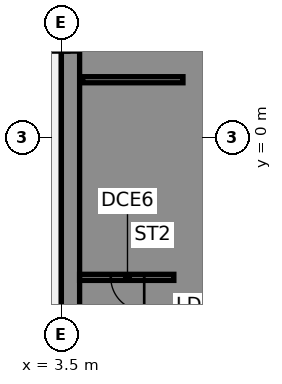
"""IFC4 building model, lengths in metres.
Left out: names, types, materials, properties, quantities, classifications, styles, units other than length and angle.
Written with IfcOpenShell. Run it as: python <this file> out.ifc"""

import sys

from ifc_helpers import new_model, si_unit, direction, frame, frame_2d, origin, place, context, subcontext, project, spatial, polyline, rectangle, outline, extrude, element, fill, save


model = new_model("IFC4")
c1 = context("Model", 3, precision=1e-05, world=origin(), true_north=direction((0.0, 1.0)))
c2 = subcontext(c1, "Body", "Model", "MODEL_VIEW")
j1 = project(units=[si_unit("LENGTHUNIT", "METRE"), si_unit("PLANEANGLEUNIT", "RADIAN")], contexts=[c1])
p1 = place(None, origin())
s1 = spatial("IfcSite", under=j1, at=p1, CompositionType="ELEMENT")
p2 = place(p1, origin())
s2 = spatial("IfcBuilding", under=s1, at=p2, CompositionType="ELEMENT")
p3 = place(p2, frame((0.0, 0.0, 109.75)))
s3 = spatial("IfcBuildingStorey", under=s2, at=p3, CompositionType="ELEMENT", Elevation=109.75)
p4 = place(p3, origin())
e1 = element("IfcWall", 1, at=p4, inside=s3, PredefinedType="SHEAR", context=c2, shape_type="SweptSolid", body=[
    extrude(outline(polyline([(9.8, -5.375), (7.5, -5.375), (7.5, -2.875), (9.8, -2.875), (9.8, -2.625), (7.5, -2.625), (7.5, -0.125), (9.8, -0.125), (9.8, 0.125), (7.5, 0.125), (7.5, 2.625), (9.8, 2.625), (9.8, 2.875), (7.5, 2.875), (7.5, 5.375), (9.8, 5.375), (9.8, 5.625), (7.5, 5.625), (7.5, 8.125), (9.8, 8.125), (9.8, 8.9), (7.5, 8.9), (7.2, 8.9), (7.2, -5.625), (7.5, -5.625), (9.8, -5.625), (9.8, -5.375)])), origin(), (0.0, 0.0, 1.0), 3.61),
])
p5 = place(p3, frame((7.5, 1.9, 0.0), z_axis=(0.0, 0.0, 1.0), x_axis=(-1.0, 0.0, 0.0)))
e2 = element("IfcWall", 2, at=p5, inside=s3, PredefinedType="SHEAR", context=c2, shape_type="SweptSolid", body=[
    extrude(rectangle(XDim=3.3, YDim=0.2, at=frame_2d((1.65, 0.0))), origin(), (0.0, 0.0, 1.0), 3.61),
])
p6 = place(p3, frame((3.8, -8.9, 0.0), z_axis=(0.0, 0.0, 1.0), x_axis=(0.0, 1.0, 0.0)))
e3 = element("IfcWall", 3, at=p6, inside=s3, PredefinedType="SHEAR", context=c2, shape_type="SweptSolid", body=[
    extrude(rectangle(XDim=17.8, YDim=0.6, at=frame_2d((8.9, 0.0))), origin(), (0.0, 0.0, 1.0), 3.61),
])
p7 = place(p6, frame((1.25, 0.0, 0.0)))
e4 = element("IfcOpeningElement", 4, at=p7, cuts=e3, PredefinedType="OPENING", context=c2, shape_type="SweptSolid", body=[
    extrude(rectangle(XDim=1.8, YDim=2.1, at=frame_2d((0.9, 1.05))), frame((0.0, 0.31, 0.0), z_axis=(0.0, -1.0, 0.0), x_axis=(1.0, 0.0, 0.0)), (0.0, 0.0, 1.0), 0.62),
])
p8 = place(p6, frame((11.698, 0.0, 0.0)))
e5 = element("IfcOpeningElement", 5, at=p8, cuts=e3, PredefinedType="OPENING", context=c2, shape_type="SweptSolid", body=[
    extrude(rectangle(XDim=1.0, YDim=2.1, at=frame_2d((0.5, 1.05))), frame((0.0, 0.31, 0.0), z_axis=(0.0, -1.0, 0.0), x_axis=(1.0, 0.0, 0.0)), (0.0, 0.0, 1.0), 0.62),
])
p9 = place(p6, frame((15.222, 0.0, 0.0)))
e6 = element("IfcOpeningElement", 6, at=p9, cuts=e3, PredefinedType="OPENING", context=c2, shape_type="SweptSolid", body=[
    extrude(rectangle(XDim=1.0, YDim=2.1, at=frame_2d((0.5, 1.05))), frame((0.0, 0.31, 0.0), z_axis=(0.0, -1.0, 0.0), x_axis=(1.0, 0.0, 0.0)), (0.0, 0.0, 1.0), 0.62),
])
p10 = place(p3, frame((7.2, -4.6, 0.0), z_axis=(0.0, 0.0, 1.0), x_axis=(-1.0, 0.0, 0.0)))
e7 = element("IfcWall", 7, at=p10, inside=s3, PredefinedType="SHEAR", context=c2, shape_type="SweptSolid", body=[
    extrude(rectangle(XDim=3.1, YDim=0.2, at=frame_2d((1.55, 0.0))), origin(), (0.0, 0.0, 1.0), 3.61),
])
p11 = place(p10, frame((0.975, 0.0, 0.0)))
e8 = element("IfcOpeningElement", 8, at=p11, cuts=e7, PredefinedType="OPENING", context=c2, shape_type="SweptSolid", body=[
    extrude(rectangle(XDim=1.1, YDim=2.1, at=frame_2d((0.55, 1.05))), frame((0.0, 0.11, 0.0), z_axis=(0.0, -1.0, 0.0), x_axis=(1.0, 0.0, 0.0)), (0.0, 0.0, 1.0), 0.22),
])
p12 = place(p8, origin())
e9 = element("IfcDoor", 9, at=p12, inside=s3, OperationType="SINGLE_SWING_LEFT", PredefinedType="DOOR", context=c2, shape_type="SweptSolid", body=[
    extrude(rectangle(XDim=1.0, YDim=2.1, at=frame_2d((0.5, 1.05))), frame((0.0, -0.225, 0.0), z_axis=(0.0, -1.0, 0.0), x_axis=(1.0, 0.0, 0.0)), (0.0, 0.0, 1.0), 0.05),
])
fill(e5, e9)
p13 = place(p11, origin())
e10 = element("IfcDoor", 10, at=p13, inside=s3, OperationType="SINGLE_SWING_LEFT", PredefinedType="DOOR", context=c2, shape_type="SweptSolid", body=[
    extrude(rectangle(XDim=1.1, YDim=2.1, at=frame_2d((0.55, 1.05))), frame((0.0, 0.025, 0.0), z_axis=(0.0, -1.0, 0.0), x_axis=(1.0, 0.0, 0.0)), (0.0, 0.0, 1.0), 0.05),
])
fill(e8, e10)
save(model, sys.argv[1])
